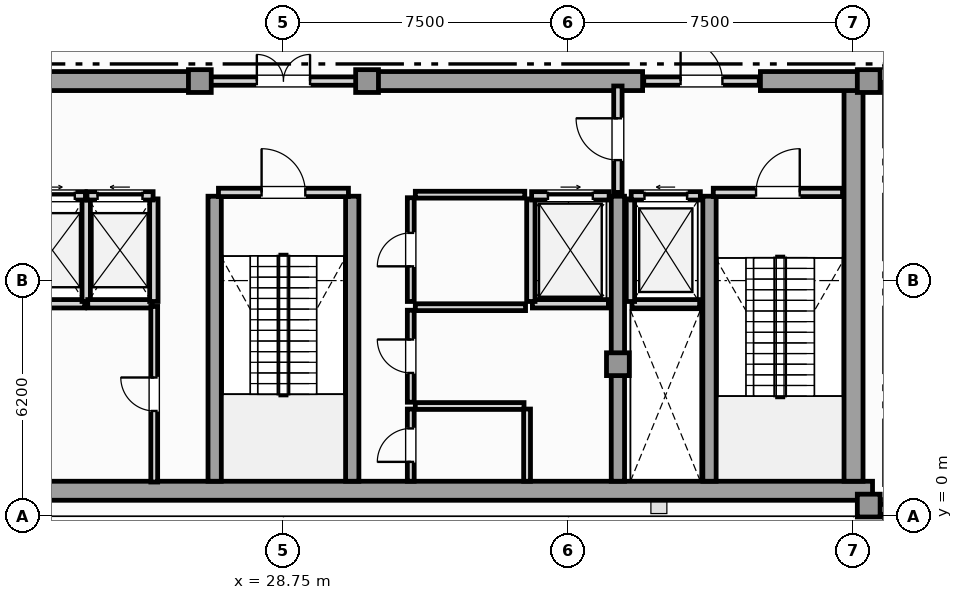
"""IFC4 building model, lengths in metres.
Left out: names, types, materials, properties, quantities, classifications, styles, units other than length and angle.
Written with IfcOpenShell. Run it as: python <this file> out.ifc"""

import sys

from ifc_helpers import new_model, si_unit, direction, frame, frame_2d, origin, origin_2d, place, context, subcontext, project, spatial, rectangle, extrude, element, fill, save


model = new_model("IFC4")
c1 = context("Model", 3, precision=1e-05, world=origin(), true_north=direction((0.0, 1.0)))
c2 = subcontext(c1, "Body", "Model", "MODEL_VIEW")
j1 = project(units=[si_unit("LENGTHUNIT", "METRE"), si_unit("PLANEANGLEUNIT", "RADIAN")], contexts=[c1])
p1 = place(None, origin())
s1 = spatial("IfcSite", under=j1, at=p1, CompositionType="ELEMENT")
p2 = place(p1, origin())
s2 = spatial("IfcBuilding", under=s1, at=p2, CompositionType="ELEMENT")
p3 = place(p2, frame((0.0, 0.0, 332.3)))
s3 = spatial("IfcBuildingStorey", under=s2, at=p3, CompositionType="ELEMENT", Elevation=332.3)
p4 = place(p3, frame((13.25, 0.67, 0.0), z_axis=(0.0, 0.0, 1.0), x_axis=(1.0, 0.0, 0.0)))
e1 = element("IfcWall", 1, at=p4, inside=s3, PredefinedType="SHEAR", context=c2, shape_type="SweptSolid", body=[
    extrude(rectangle(XDim=31.0, YDim=0.5, at=frame_2d((15.5, 0.0))), origin(), (0.0, 0.0, 1.0), 4.98),
])
p5 = place(p3, frame((43.75, 0.92, 0.0), z_axis=(0.0, 0.0, 1.0), x_axis=(0.0, 1.0, 0.0)))
e2 = element("IfcWall", 2, at=p5, inside=s3, PredefinedType="SHEAR", context=c2, shape_type="SweptSolid", body=[
    extrude(rectangle(XDim=10.53, YDim=0.5, at=frame_2d((5.265, 0.0))), origin(), (0.0, 0.0, 1.0), 4.98),
])
for number, where, z_axis, x_axis in (
    (3, (19.3, 11.45, 0.0), (0.0, 0.0, 1.0), (1.0, 0.0, 0.0)),
    (4, (30.9, 11.45, 0.0), (0.0, 0.0, 1.0), (1.0, 0.0, 0.0)),
):
    element("IfcWall", number, at=place(p3, frame(where, z_axis=z_axis, x_axis=x_axis)), inside=s3, PredefinedType="SHEAR", context=c2, shape_type="SweptSolid", body=[
        extrude(rectangle(XDim=7.3, YDim=0.5, at=frame_2d((3.65, 0.0))), origin(), (0.0, 0.0, 1.0), 4.98),
    ])
p6 = place(p3, frame((41.3, 11.45, 0.0), z_axis=(0.0, 0.0, 1.0), x_axis=(1.0, 0.0, 0.0)))
e5 = element("IfcWall", 5, at=p6, inside=s3, PredefinedType="SHEAR", context=c2, shape_type="SweptSolid", body=[
    extrude(rectangle(XDim=2.95, YDim=0.5, at=frame_2d((1.475, 0.0))), origin(), (0.0, 0.0, 1.0), 4.98),
])
for number, where, z_axis, x_axis in (
    (6, (26.94, 0.92, 0.0), (0.0, 0.0, 1.0), (0.0, 1.0, 0.0)),
    (7, (30.56, 0.92, 0.0), (0.0, 0.0, 1.0), (0.0, 1.0, 0.0)),
    (8, (37.55, 0.92, 0.0), (0.0, 0.0, 1.0), (0.0, 1.0, 0.0)),
    (9, (39.96, 0.92, 0.0), (0.0, 0.0, 1.0), (0.0, 1.0, 0.0)),
):
    element("IfcWall", number, at=place(p3, frame(where, z_axis=z_axis, x_axis=x_axis)), inside=s3, PredefinedType="SHEAR", context=c2, shape_type="SweptSolid", body=[
        extrude(rectangle(XDim=7.5, YDim=0.35, at=frame_2d((3.75, 0.0))), origin(), (0.0, 0.0, 1.0), 4.98),
    ])
for number, where, z_axis, x_axis in (
    (10, (44.15, 0.28, 0.0), (0.0, 0.0, 1.0), (1.0, 0.0, 0.0)),
    (11, (44.15, 11.45, 0.0), (0.0, 0.0, 1.0), (1.0, 0.0, 0.0)),
    (12, (37.55, 4.0, 0.0), (0.0, 0.0, 1.0), (1.0, 0.0, 0.0)),
    (13, (26.55, 11.45, 0.0), (0.0, 0.0, 1.0), (1.0, 0.0, 0.0)),
    (14, (30.95, 11.45, 0.0), (0.0, 0.0, 1.0), (1.0, 0.0, 0.0)),
):
    element("IfcColumn", number, at=place(p3, frame(where, z_axis=z_axis, x_axis=x_axis)), inside=s3, PredefinedType="COLUMN", context=c2, shape_type="SweptSolid", body=[
        extrude(rectangle(XDim=0.6, YDim=0.6, at=origin_2d()), origin(), (0.0, 0.0, 1.0), 5.2),
    ])
p7 = place(p3, frame((44.25, 0.18, 0.0), z_axis=(0.0, 0.0, 1.0), x_axis=(1.0, 0.0, 0.0)))
e15 = element("IfcWall", 15, at=p7, inside=s3, PredefinedType="SOLIDWALL", context=c2, shape_type="SweptSolid", body=[
    extrude(rectangle(XDim=0.733, YDim=0.26, at=frame_2d((0.366, 0.0))), origin(), (0.0, 0.0, 1.0), 4.98),
])
p8 = place(p3, frame((37.92, 5.59, 0.0), z_axis=(0.0, 0.0, 1.0), x_axis=(1.0, 0.0, 0.0)))
e16 = element("IfcWall", 16, at=p8, inside=s3, PredefinedType="SOLIDWALL", context=c2, shape_type="SweptSolid", body=[
    extrude(rectangle(XDim=1.78, YDim=0.22, at=frame_2d((0.89, 0.0))), origin(), (0.0, 0.0, 1.0), 4.98),
])
p9 = place(p3, frame((37.88, 5.65, 0.0), z_axis=(0.0, 0.0, 1.0), x_axis=(0.0, 1.0, 0.0)))
e17 = element("IfcWall", 17, at=p9, inside=s3, PredefinedType="SOLIDWALL", context=c2, shape_type="SweptSolid", body=[
    extrude(rectangle(XDim=2.7, YDim=0.22, at=frame_2d((1.35, 0.0))), origin(), (0.0, 0.0, 1.0), 4.98),
])
p10 = place(p3, frame((37.9, 8.43, 0.0), z_axis=(0.0, 0.0, 1.0), x_axis=(1.0, 0.0, 0.0)))
e18 = element("IfcWall", 18, at=p10, inside=s3, PredefinedType="SOLIDWALL", context=c2, shape_type="SweptSolid", body=[
    extrude(rectangle(XDim=1.82, YDim=0.22, at=frame_2d((0.91, 0.0))), origin(), (0.0, 0.0, 1.0), 4.98),
])
p11 = place(p10, frame((0.35, 0.0, 0.0)))
e19 = element("IfcOpeningElement", 19, at=p11, cuts=e18, PredefinedType="OPENING", context=c2, shape_type="SweptSolid", body=[
    extrude(rectangle(XDim=1.12, YDim=2.25, at=frame_2d((0.56, 1.125))), frame((0.0, 0.12, 0.0), z_axis=(0.0, -1.0, 0.0), x_axis=(1.0, 0.0, 0.0)), (0.0, 0.0, 1.0), 0.24),
])
p12 = place(p3, frame((35.3, 5.59, 0.0), z_axis=(0.0, 0.0, 1.0), x_axis=(1.0, 0.0, 0.0)))
e20 = element("IfcWall", 20, at=p12, inside=s3, PredefinedType="SOLIDWALL", context=c2, shape_type="SweptSolid", body=[
    extrude(rectangle(XDim=2.0, YDim=0.22, at=frame_2d((1.0, 0.0))), origin(), (0.0, 0.0, 1.0), 4.98),
])
p13 = place(p3, frame((35.26, 5.65, 0.0), z_axis=(0.0, 0.0, 1.0), x_axis=(0.0, 1.0, 0.0)))
e21 = element("IfcWall", 21, at=p13, inside=s3, PredefinedType="SOLIDWALL", context=c2, shape_type="SweptSolid", body=[
    extrude(rectangle(XDim=2.7, YDim=0.22, at=frame_2d((1.35, 0.0))), origin(), (0.0, 0.0, 1.0), 4.98),
])
p14 = place(p3, frame((35.28, 8.43, 0.0), z_axis=(0.0, 0.0, 1.0), x_axis=(1.0, 0.0, 0.0)))
e22 = element("IfcWall", 22, at=p14, inside=s3, PredefinedType="SOLIDWALL", context=c2, shape_type="SweptSolid", body=[
    extrude(rectangle(XDim=2.04, YDim=0.22, at=frame_2d((1.02, 0.0))), origin(), (0.0, 0.0, 1.0), 4.98),
])
p15 = place(p14, frame((0.43, 0.0, 0.0)))
e23 = element("IfcOpeningElement", 23, at=p15, cuts=e22, PredefinedType="OPENING", context=c2, shape_type="SweptSolid", body=[
    extrude(rectangle(XDim=1.18, YDim=2.2, at=frame_2d((0.59, 1.1))), frame((0.0, 0.12, 0.0), z_axis=(0.0, -1.0, 0.0), x_axis=(1.0, 0.0, 0.0)), (0.0, 0.0, 1.0), 0.24),
])
p16 = place(p3, frame((21.82, 5.59, 0.0), z_axis=(0.0, 0.0, 1.0), x_axis=(1.0, 0.0, 0.0)))
e24 = element("IfcWall", 24, at=p16, inside=s3, PredefinedType="SOLIDWALL", context=c2, shape_type="SweptSolid", body=[
    extrude(rectangle(XDim=1.7, YDim=0.22, at=frame_2d((0.85, 0.0))), origin(), (0.0, 0.0, 1.0), 4.98),
])
p17 = place(p3, frame((23.56, 5.65, 0.0), z_axis=(0.0, 0.0, 1.0), x_axis=(0.0, 1.0, 0.0)))
e25 = element("IfcWall", 25, at=p17, inside=s3, PredefinedType="SOLIDWALL", context=c2, shape_type="SweptSolid", body=[
    extrude(rectangle(XDim=2.7, YDim=0.22, at=frame_2d((1.35, 0.0))), origin(), (0.0, 0.0, 1.0), 4.98),
])
p18 = place(p3, frame((21.8, 8.43, 0.0), z_axis=(0.0, 0.0, 1.0), x_axis=(1.0, 0.0, 0.0)))
e26 = element("IfcWall", 26, at=p18, inside=s3, PredefinedType="SOLIDWALL", context=c2, shape_type="SweptSolid", body=[
    extrude(rectangle(XDim=1.74, YDim=0.22, at=frame_2d((0.87, 0.0))), origin(), (0.0, 0.0, 1.0), 4.98),
])
p19 = place(p18, frame((0.28, 0.0, 0.0)))
e27 = element("IfcOpeningElement", 27, at=p19, cuts=e26, PredefinedType="OPENING", context=c2, shape_type="SweptSolid", body=[
    extrude(rectangle(XDim=1.18, YDim=2.2, at=frame_2d((0.59, 1.1))), frame((0.0, 0.12, 0.0), z_axis=(0.0, -1.0, 0.0), x_axis=(1.0, 0.0, 0.0)), (0.0, 0.0, 1.0), 0.24),
])
p20 = place(p3, frame((23.6, 5.59, 0.0), z_axis=(0.0, 0.0, 1.0), x_axis=(1.0, 0.0, 0.0)))
e28 = element("IfcWall", 28, at=p20, inside=s3, PredefinedType="SOLIDWALL", context=c2, shape_type="SweptSolid", body=[
    extrude(rectangle(XDim=1.7, YDim=0.22, at=frame_2d((0.85, 0.0))), origin(), (0.0, 0.0, 1.0), 4.98),
])
p21 = place(p3, frame((25.34, 5.65, 0.0), z_axis=(0.0, 0.0, 1.0), x_axis=(0.0, 1.0, 0.0)))
e29 = element("IfcWall", 29, at=p21, inside=s3, PredefinedType="SOLIDWALL", context=c2, shape_type="SweptSolid", body=[
    extrude(rectangle(XDim=2.7, YDim=0.22, at=frame_2d((1.35, 0.0))), origin(), (0.0, 0.0, 1.0), 4.98),
])
p22 = place(p3, frame((23.58, 8.43, 0.0), z_axis=(0.0, 0.0, 1.0), x_axis=(1.0, 0.0, 0.0)))
e30 = element("IfcWall", 30, at=p22, inside=s3, PredefinedType="SOLIDWALL", context=c2, shape_type="SweptSolid", body=[
    extrude(rectangle(XDim=1.74, YDim=0.22, at=frame_2d((0.87, 0.0))), origin(), (0.0, 0.0, 1.0), 4.98),
])
p23 = place(p22, frame((0.28, 0.0, 0.0)))
e31 = element("IfcOpeningElement", 31, at=p23, cuts=e30, PredefinedType="OPENING", context=c2, shape_type="SweptSolid", body=[
    extrude(rectangle(XDim=1.18, YDim=2.2, at=frame_2d((0.59, 1.1))), frame((0.0, 0.12, 0.0), z_axis=(0.0, -1.0, 0.0), x_axis=(1.0, 0.0, 0.0)), (0.0, 0.0, 1.0), 0.24),
])
p24 = place(p3, frame((40.06, 8.52, 0.0), z_axis=(0.0, 0.0, 1.0), x_axis=(1.0, 0.0, 0.0)))
e32 = element("IfcWall", 32, at=p24, inside=s3, PredefinedType="SOLIDWALL", context=c2, shape_type="SweptSolid", body=[
    extrude(rectangle(XDim=3.4, YDim=0.22, at=frame_2d((1.7, 0.0))), origin(), (0.0, 0.0, 1.0), 4.98),
])
p25 = place(p24, frame((1.125, 0.0, 0.0)))
e33 = element("IfcOpeningElement", 33, at=p25, cuts=e32, PredefinedType="OPENING", context=c2, shape_type="SweptSolid", body=[
    extrude(rectangle(XDim=1.15, YDim=2.2, at=frame_2d((0.575, 1.1))), frame((0.0, 0.12, 0.0), z_axis=(0.0, -1.0, 0.0), x_axis=(1.0, 0.0, 0.0)), (0.0, 0.0, 1.0), 0.24),
])
p26 = place(p3, frame((27.04, 8.52, 0.0), z_axis=(0.0, 0.0, 1.0), x_axis=(1.0, 0.0, 0.0)))
e34 = element("IfcWall", 34, at=p26, inside=s3, PredefinedType="SOLIDWALL", context=c2, shape_type="SweptSolid", body=[
    extrude(rectangle(XDim=3.42, YDim=0.22, at=frame_2d((1.71, 0.0))), origin(), (0.0, 0.0, 1.0), 4.98),
])
p27 = place(p26, frame((1.135, 0.0, 0.0)))
e35 = element("IfcOpeningElement", 35, at=p27, cuts=e34, PredefinedType="OPENING", context=c2, shape_type="SweptSolid", body=[
    extrude(rectangle(XDim=1.15, YDim=2.2, at=frame_2d((0.575, 1.1))), frame((0.0, 0.12, 0.0), z_axis=(0.0, -1.0, 0.0), x_axis=(1.0, 0.0, 0.0)), (0.0, 0.0, 1.0), 0.24),
])
p28 = place(p3, frame((37.55, 8.52, 0.0), z_axis=(0.0, 0.0, 1.0), x_axis=(0.0, 1.0, 0.0)))
e36 = element("IfcWall", 36, at=p28, inside=s3, PredefinedType="SOLIDWALL", context=c2, shape_type="SweptSolid", body=[
    extrude(rectangle(XDim=2.8, YDim=0.22, at=frame_2d((1.4, 0.0))), origin(), (0.0, 0.0, 1.0), 4.436),
])
p29 = place(p28, frame((0.85, 0.0, 0.0)))
e37 = element("IfcOpeningElement", 37, at=p29, cuts=e36, PredefinedType="OPENING", context=c2, shape_type="SweptSolid", body=[
    extrude(rectangle(XDim=1.1, YDim=2.2, at=frame_2d((0.55, 1.1))), frame((0.0, 0.12, 0.0), z_axis=(0.0, -1.0, 0.0), x_axis=(1.0, 0.0, 0.0)), (0.0, 0.0, 1.0), 0.24),
])
p30 = place(p3, frame((26.63, 11.45, 0.0), z_axis=(0.0, 0.0, 1.0), x_axis=(1.0, 0.0, 0.0)))
e38 = element("IfcWall", 38, at=p30, inside=s3, PredefinedType="SOLIDWALL", context=c2, shape_type="SweptSolid", body=[
    extrude(rectangle(XDim=4.24, YDim=0.22, at=frame_2d((2.12, 0.0))), origin(), (0.0, 0.0, 1.0), 4.98),
])
p31 = place(p30, frame((1.42, 0.0, 0.0)))
e39 = element("IfcOpeningElement", 39, at=p31, cuts=e38, PredefinedType="OPENING", context=c2, shape_type="SweptSolid", body=[
    extrude(rectangle(XDim=1.4, YDim=2.2, at=frame_2d((0.7, 1.1))), frame((0.0, 0.12, 0.0), z_axis=(0.0, -1.0, 0.0), x_axis=(1.0, 0.0, 0.0)), (0.0, 0.0, 1.0), 0.24),
])
p32 = place(p3, frame((38.23, 11.45, 0.0), z_axis=(0.0, 0.0, 1.0), x_axis=(1.0, 0.0, 0.0)))
e40 = element("IfcWall", 40, at=p32, inside=s3, PredefinedType="SOLIDWALL", context=c2, shape_type="SweptSolid", body=[
    extrude(rectangle(XDim=3.04, YDim=0.22, at=frame_2d((1.52, 0.0))), origin(), (0.0, 0.0, 1.0), 4.98),
])
p33 = place(p32, frame((0.97, 0.0, 0.0)))
e41 = element("IfcOpeningElement", 41, at=p33, cuts=e40, PredefinedType="OPENING", context=c2, shape_type="SweptSolid", body=[
    extrude(rectangle(XDim=1.1, YDim=2.2, at=frame_2d((0.55, 1.1))), frame((0.0, 0.12, 0.0), z_axis=(0.0, -1.0, 0.0), x_axis=(1.0, 0.0, 0.0)), (0.0, 0.0, 1.0), 0.24),
])
p34 = place(p3, frame((25.35, 0.9, 0.0), z_axis=(0.0, 0.0, 1.0), x_axis=(0.0, 1.0, 0.0)))
e42 = element("IfcWall", 42, at=p34, inside=s3, PredefinedType="PARTITIONING", context=c2, shape_type="SweptSolid", body=[
    extrude(rectangle(XDim=4.62, YDim=0.18, at=frame_2d((2.31, 0.0))), origin(), (0.0, 0.0, 1.0), 4.98),
])
p35 = place(p34, frame((1.87, 0.0, 0.0)))
e43 = element("IfcOpeningElement", 43, at=p35, cuts=e42, PredefinedType="OPENING", context=c2, shape_type="SweptSolid", body=[
    extrude(rectangle(XDim=0.88, YDim=2.05, at=frame_2d((0.44, 1.025))), frame((0.0, 0.1, 0.0), z_axis=(0.0, -1.0, 0.0), x_axis=(1.0, 0.0, 0.0)), (0.0, 0.0, 1.0), 0.2),
])
p36 = place(p3, frame((32.1, 0.92, 0.0), z_axis=(0.0, 0.0, 1.0), x_axis=(0.0, 1.0, 0.0)))
e44 = element("IfcWall", 44, at=p36, inside=s3, PredefinedType="PARTITIONING", context=c2, shape_type="SweptSolid", body=[
    extrude(rectangle(XDim=1.9, YDim=0.18, at=frame_2d((0.95, 0.0))), origin(), (0.0, 0.0, 1.0), 4.98),
])
p37 = place(p36, frame((0.51, 0.0, 0.0)))
e45 = element("IfcOpeningElement", 45, at=p37, cuts=e44, PredefinedType="OPENING", context=c2, shape_type="SweptSolid", body=[
    extrude(rectangle(XDim=0.88, YDim=2.05, at=frame_2d((0.44, 1.025))), frame((0.0, 0.1, 0.0), z_axis=(0.0, -1.0, 0.0), x_axis=(1.0, 0.0, 0.0)), (0.0, 0.0, 1.0), 0.2),
])
p38 = place(p3, frame((32.22, 2.9, 0.0), z_axis=(0.0, 0.0, 1.0), x_axis=(1.0, 0.0, 0.0)))
e46 = element("IfcWall", 46, at=p38, inside=s3, PredefinedType="PARTITIONING", context=c2, shape_type="SweptSolid", body=[
    extrude(rectangle(XDim=2.86, YDim=0.18, at=frame_2d((1.43, 0.0))), origin(), (0.0, 0.0, 1.0), 4.98),
])
p39 = place(p3, frame((35.16, 0.92, 0.0), z_axis=(0.0, 0.0, 1.0), x_axis=(0.0, 1.0, 0.0)))
e47 = element("IfcWall", 47, at=p39, inside=s3, PredefinedType="PARTITIONING", context=c2, shape_type="SweptSolid", body=[
    extrude(rectangle(XDim=1.9, YDim=0.18, at=frame_2d((0.95, 0.0))), origin(), (0.0, 0.0, 1.0), 4.98),
])
p40 = place(p3, frame((32.1, 3.0, 0.0), z_axis=(0.0, 0.0, 1.0), x_axis=(0.0, 1.0, 0.0)))
e48 = element("IfcWall", 48, at=p40, inside=s3, PredefinedType="PARTITIONING", context=c2, shape_type="SweptSolid", body=[
    extrude(rectangle(XDim=2.42, YDim=0.18, at=frame_2d((1.21, 0.0))), origin(), (0.0, 0.0, 1.0), 4.98),
])
p41 = place(p40, frame((0.77, 0.0, 0.0)))
e49 = element("IfcOpeningElement", 49, at=p41, cuts=e48, PredefinedType="OPENING", context=c2, shape_type="SweptSolid", body=[
    extrude(rectangle(XDim=0.88, YDim=2.05, at=frame_2d((0.44, 1.025))), frame((0.0, 0.1, 0.0), z_axis=(0.0, -1.0, 0.0), x_axis=(1.0, 0.0, 0.0)), (0.0, 0.0, 1.0), 0.2),
])
p42 = place(p3, frame((32.22, 5.5, 0.0), z_axis=(0.0, 0.0, 1.0), x_axis=(1.0, 0.0, 0.0)))
e50 = element("IfcWall", 50, at=p42, inside=s3, PredefinedType="PARTITIONING", context=c2, shape_type="SweptSolid", body=[
    extrude(rectangle(XDim=2.9, YDim=0.18, at=frame_2d((1.45, 0.0))), origin(), (0.0, 0.0, 1.0), 4.98),
])
p43 = place(p3, frame((32.1, 5.65, 0.0), z_axis=(0.0, 0.0, 1.0), x_axis=(0.0, 1.0, 0.0)))
e51 = element("IfcWall", 51, at=p43, inside=s3, PredefinedType="PARTITIONING", context=c2, shape_type="SweptSolid", body=[
    extrude(rectangle(XDim=2.73, YDim=0.18, at=frame_2d((1.365, 0.0))), origin(), (0.0, 0.0, 1.0), 4.98),
])
p44 = place(p43, frame((0.925, 0.0, 0.0)))
e52 = element("IfcOpeningElement", 52, at=p44, cuts=e51, PredefinedType="OPENING", context=c2, shape_type="SweptSolid", body=[
    extrude(rectangle(XDim=0.88, YDim=2.05, at=frame_2d((0.44, 1.025))), frame((0.0, 0.1, 0.0), z_axis=(0.0, -1.0, 0.0), x_axis=(1.0, 0.0, 0.0)), (0.0, 0.0, 1.0), 0.2),
])
p45 = place(p3, frame((32.22, 8.46, 0.0), z_axis=(0.0, 0.0, 1.0), x_axis=(1.0, 0.0, 0.0)))
e53 = element("IfcWall", 53, at=p45, inside=s3, PredefinedType="PARTITIONING", context=c2, shape_type="SweptSolid", body=[
    extrude(rectangle(XDim=2.88, YDim=0.18, at=frame_2d((1.44, 0.0))), origin(), (0.0, 0.0, 1.0), 4.98),
])
p46 = place(p11, origin())
e54 = element("IfcDoor", 54, at=p46, inside=s3, OperationType="SLIDING_TO_LEFT", PredefinedType="DOOR", context=c2, shape_type="SweptSolid", body=[
    extrude(rectangle(XDim=1.12, YDim=2.25, at=frame_2d((0.56, 1.125))), frame((0.0, 0.025, 0.0), z_axis=(0.0, -1.0, 0.0), x_axis=(1.0, 0.0, 0.0)), (0.0, 0.0, 1.0), 0.05),
])
fill(e19, e54)
p47 = place(p15, origin())
e55 = element("IfcDoor", 55, at=p47, inside=s3, OperationType="SLIDING_TO_RIGHT", PredefinedType="DOOR", context=c2, shape_type="SweptSolid", body=[
    extrude(rectangle(XDim=1.18, YDim=2.2, at=frame_2d((0.59, 1.1))), frame((0.0, 0.025, 0.0), z_axis=(0.0, -1.0, 0.0), x_axis=(1.0, 0.0, 0.0)), (0.0, 0.0, 1.0), 0.05),
])
fill(e23, e55)
p48 = place(p19, origin())
e56 = element("IfcDoor", 56, at=p48, inside=s3, OperationType="SLIDING_TO_RIGHT", PredefinedType="DOOR", context=c2, shape_type="SweptSolid", body=[
    extrude(rectangle(XDim=1.18, YDim=2.2, at=frame_2d((0.59, 1.1))), frame((0.0, 0.025, 0.0), z_axis=(0.0, -1.0, 0.0), x_axis=(1.0, 0.0, 0.0)), (0.0, 0.0, 1.0), 0.05),
])
fill(e27, e56)
p49 = place(p23, origin())
e57 = element("IfcDoor", 57, at=p49, inside=s3, OperationType="SLIDING_TO_LEFT", PredefinedType="DOOR", context=c2, shape_type="SweptSolid", body=[
    extrude(rectangle(XDim=1.18, YDim=2.2, at=frame_2d((0.59, 1.1))), frame((0.0, 0.025, 0.0), z_axis=(0.0, -1.0, 0.0), x_axis=(1.0, 0.0, 0.0)), (0.0, 0.0, 1.0), 0.05),
])
fill(e31, e57)
p50 = place(p25, origin())
e58 = element("IfcDoor", 58, at=p50, inside=s3, OperationType="SINGLE_SWING_RIGHT", PredefinedType="DOOR", context=c2, shape_type="SweptSolid", body=[
    extrude(rectangle(XDim=1.15, YDim=2.2, at=frame_2d((0.575, 1.1))), frame((0.0, 0.025, 0.0), z_axis=(0.0, -1.0, 0.0), x_axis=(1.0, 0.0, 0.0)), (0.0, 0.0, 1.0), 0.05),
])
fill(e33, e58)
p51 = place(p27, origin())
e59 = element("IfcDoor", 59, at=p51, inside=s3, OperationType="SINGLE_SWING_LEFT", PredefinedType="DOOR", context=c2, shape_type="SweptSolid", body=[
    extrude(rectangle(XDim=1.15, YDim=2.2, at=frame_2d((0.575, 1.1))), frame((0.0, 0.025, 0.0), z_axis=(0.0, -1.0, 0.0), x_axis=(1.0, 0.0, 0.0)), (0.0, 0.0, 1.0), 0.05),
])
fill(e35, e59)
p52 = place(p29, origin())
e60 = element("IfcDoor", 60, at=p52, inside=s3, OperationType="SINGLE_SWING_RIGHT", PredefinedType="DOOR", context=c2, shape_type="SweptSolid", body=[
    extrude(rectangle(XDim=1.1, YDim=2.2, at=frame_2d((0.55, 1.1))), frame((0.0, 0.025, 0.0), z_axis=(0.0, -1.0, 0.0), x_axis=(1.0, 0.0, 0.0)), (0.0, 0.0, 1.0), 0.05),
])
fill(e37, e60)
p53 = place(p31, origin())
e61 = element("IfcDoor", 61, at=p53, inside=s3, OperationType="DOUBLE_DOOR_SINGLE_SWING", PredefinedType="DOOR", context=c2, shape_type="SweptSolid", body=[
    extrude(rectangle(XDim=1.4, YDim=2.2, at=frame_2d((0.7, 1.1))), frame((0.0, 0.025, 0.0), z_axis=(0.0, -1.0, 0.0), x_axis=(1.0, 0.0, 0.0)), (0.0, 0.0, 1.0), 0.05),
])
fill(e39, e61)
p54 = place(p33, origin())
e62 = element("IfcDoor", 62, at=p54, inside=s3, OperationType="SINGLE_SWING_LEFT", PredefinedType="DOOR", context=c2, shape_type="SweptSolid", body=[
    extrude(rectangle(XDim=1.1, YDim=2.2, at=frame_2d((0.55, 1.1))), frame((0.0, 0.025, 0.0), z_axis=(0.0, -1.0, 0.0), x_axis=(1.0, 0.0, 0.0)), (0.0, 0.0, 1.0), 0.05),
])
fill(e41, e62)
p55 = place(p35, origin())
e63 = element("IfcDoor", 63, at=p55, inside=s3, OperationType="SINGLE_SWING_RIGHT", PredefinedType="DOOR", context=c2, shape_type="SweptSolid", body=[
    extrude(rectangle(XDim=0.88, YDim=2.05, at=frame_2d((0.44, 1.025))), frame((0.0, 0.025, 0.0), z_axis=(0.0, -1.0, 0.0), x_axis=(1.0, 0.0, 0.0)), (0.0, 0.0, 1.0), 0.05),
])
fill(e43, e63)
p56 = place(p37, origin())
e64 = element("IfcDoor", 64, at=p56, inside=s3, OperationType="SINGLE_SWING_LEFT", PredefinedType="DOOR", context=c2, shape_type="SweptSolid", body=[
    extrude(rectangle(XDim=0.88, YDim=2.05, at=frame_2d((0.44, 1.025))), frame((0.0, 0.025, 0.0), z_axis=(0.0, -1.0, 0.0), x_axis=(1.0, 0.0, 0.0)), (0.0, 0.0, 1.0), 0.05),
])
fill(e45, e64)
p57 = place(p41, origin())
e65 = element("IfcDoor", 65, at=p57, inside=s3, OperationType="SINGLE_SWING_RIGHT", PredefinedType="DOOR", context=c2, shape_type="SweptSolid", body=[
    extrude(rectangle(XDim=0.88, YDim=2.05, at=frame_2d((0.44, 1.025))), frame((0.0, 0.025, 0.0), z_axis=(0.0, -1.0, 0.0), x_axis=(1.0, 0.0, 0.0)), (0.0, 0.0, 1.0), 0.05),
])
fill(e49, e65)
p58 = place(p44, origin())
e66 = element("IfcDoor", 66, at=p58, inside=s3, OperationType="SINGLE_SWING_LEFT", PredefinedType="DOOR", context=c2, shape_type="SweptSolid", body=[
    extrude(rectangle(XDim=0.88, YDim=2.05, at=frame_2d((0.44, 1.025))), frame((0.0, 0.025, 0.0), z_axis=(0.0, -1.0, 0.0), x_axis=(1.0, 0.0, 0.0)), (0.0, 0.0, 1.0), 0.05),
])
fill(e52, e66)
save(model, sys.argv[1])
